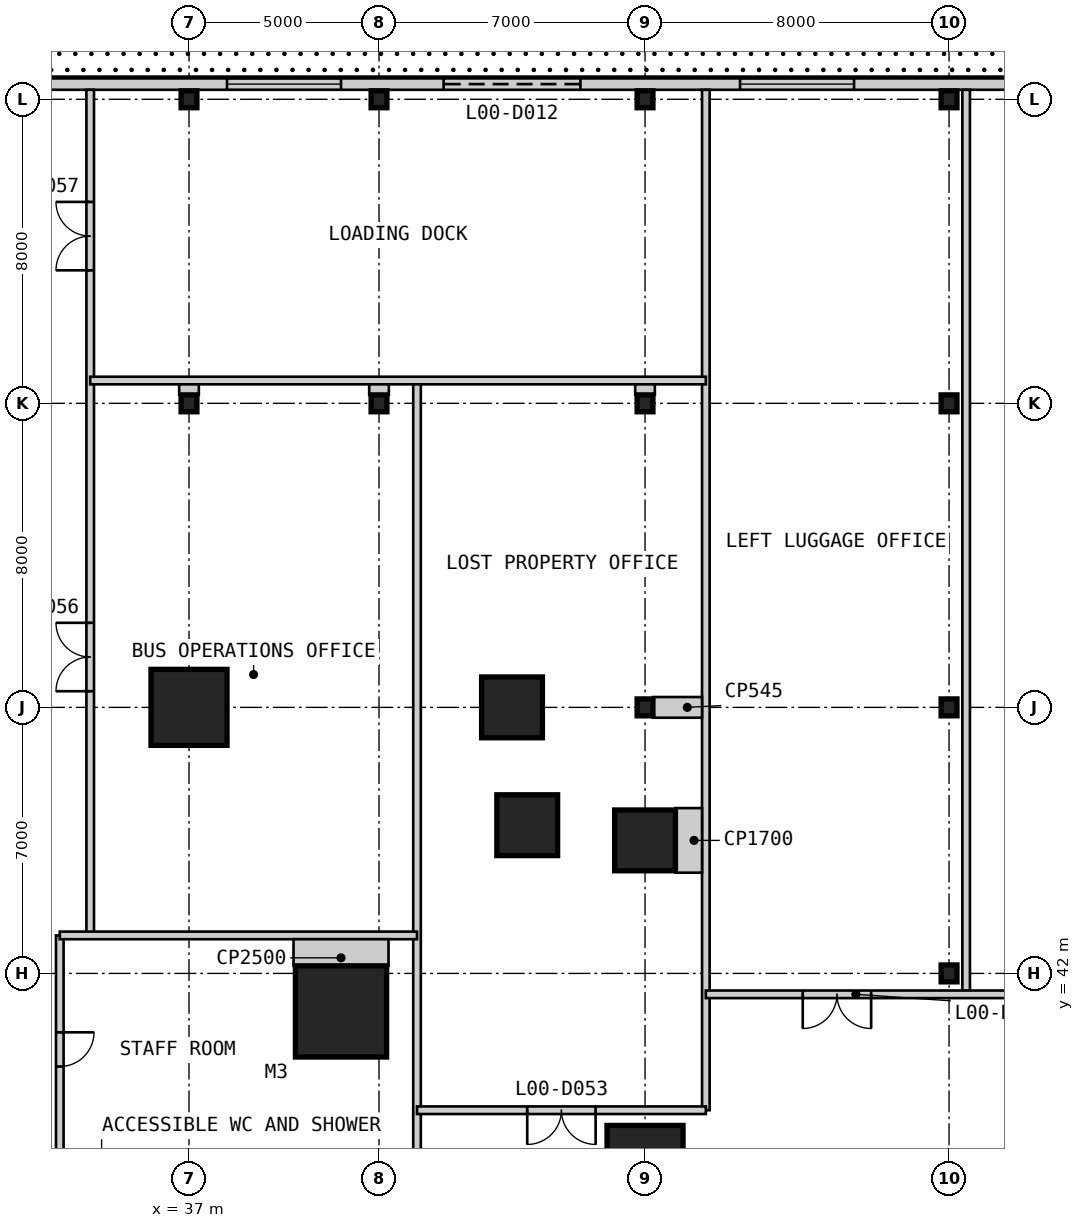
"""IFC4 building model, lengths in metres.
Left out: names, types, materials, properties, quantities, classifications, styles, units other than length and angle.
Written with IfcOpenShell. Run it as: python <this file> out.ifc"""

import sys

from ifc_helpers import new_model, si_unit, direction, frame, frame_2d, origin, origin_2d, place, context, subcontext, project, spatial, rectangle, i_section, extrude, element, fill, save


model = new_model("IFC4")
c1 = context("Model", 3, precision=1e-05, world=origin(), true_north=direction((0.0, 1.0)))
c2 = subcontext(c1, "Body", "Model", "MODEL_VIEW")
j1 = project(units=[si_unit("LENGTHUNIT", "METRE"), si_unit("PLANEANGLEUNIT", "RADIAN")], contexts=[c1])
p1 = place(None, origin())
s1 = spatial("IfcSite", under=j1, at=p1, CompositionType="ELEMENT")
p2 = place(p1, origin())
s2 = spatial("IfcBuilding", under=s1, at=p2, CompositionType="ELEMENT")
p3 = place(p2, origin())
s3 = spatial("IfcBuildingStorey", under=s2, at=p3, CompositionType="ELEMENT", Elevation=0.0)
p4 = place(p3, frame((41.0, 41.0, 0.0), z_axis=(0.0, 0.0, 1.0), x_axis=(1.0, 0.0, 0.0)))
e1 = element("IfcColumn", 1, at=p4, inside=s3, PredefinedType="COLUMN", context=c2, shape_type="SweptSolid", body=[
    extrude(rectangle(XDim=2.4, YDim=2.4, at=origin_2d()), origin(), (0.0, 0.0, 1.0), 7.0),
])
p5 = place(p3, frame((49.0, 37.0, 0.0), z_axis=(0.0, 0.0, 1.0), x_axis=(1.0, 0.0, 0.0)))
e2 = element("IfcColumn", 2, at=p5, inside=s3, PredefinedType="COLUMN", context=c2, shape_type="SweptSolid", body=[
    extrude(rectangle(XDim=2.0, YDim=2.0, at=origin_2d()), origin(), (0.0, 0.0, 1.0), 7.0),
])
for number, where, z_axis, x_axis in (
    (3, (49.0, 45.5, 0.0), (0.0, 0.0, 1.0), (1.0, 0.0, 0.0)),
    (4, (45.9, 45.9, 0.0), (0.0, 0.0, 1.0), (1.0, 0.0, 0.0)),
    (5, (45.5, 49.0, 0.0), (0.0, 0.0, 1.0), (1.0, 0.0, 0.0)),
):
    element("IfcColumn", number, at=place(p3, frame(where, z_axis=z_axis, x_axis=x_axis)), inside=s3, PredefinedType="COLUMN", context=c2, shape_type="SweptSolid", body=[
        extrude(rectangle(XDim=1.6, YDim=1.6, at=origin_2d()), origin(), (0.0, 0.0, 1.0), 7.0),
    ])
p6 = place(p3, frame((37.0, 49.0, 0.0), z_axis=(0.0, 0.0, 1.0), x_axis=(1.0, 0.0, 0.0)))
e6 = element("IfcColumn", 6, at=p6, inside=s3, PredefinedType="COLUMN", context=c2, shape_type="SweptSolid", body=[
    extrude(rectangle(XDim=2.0, YDim=2.0, at=origin_2d()), origin(), (0.0, 0.0, 1.0), 7.0),
])
p7 = place(p3, frame((37.0, 57.0, 0.0), z_axis=(0.0, 0.0, 1.0), x_axis=(1.0, 0.0, 0.0)))
e7 = element("IfcColumn", 7, at=p7, inside=s3, PredefinedType="COLUMN", context=c2, shape_type="SweptSolid", body=[
    extrude(i_section(OverallWidth=0.417, OverallDepth=0.445, WebThickness=0.039, FlangeThickness=0.063, at=origin_2d()), origin(), (0.0, 0.0, 1.0), 7.0),
])
p8 = place(p3, frame((37.0, 65.0, -0.3), z_axis=(0.0, 0.0, 1.0), x_axis=(1.0, 0.0, 0.0)))
e8 = element("IfcColumn", 8, at=p8, inside=s3, PredefinedType="COLUMN", context=c2, shape_type="SweptSolid", body=[
    extrude(i_section(OverallWidth=0.417, OverallDepth=0.445, WebThickness=0.039, FlangeThickness=0.063, at=origin_2d()), origin(), (0.0, 0.0, 1.0), 7.3),
])
p9 = place(p3, frame((42.0, 57.0, 0.0), z_axis=(0.0, 0.0, 1.0), x_axis=(1.0, 0.0, 0.0)))
e9 = element("IfcColumn", 9, at=p9, inside=s3, PredefinedType="COLUMN", context=c2, shape_type="SweptSolid", body=[
    extrude(i_section(OverallWidth=0.417, OverallDepth=0.445, WebThickness=0.039, FlangeThickness=0.063, at=origin_2d()), origin(), (0.0, 0.0, 1.0), 7.0),
])
p10 = place(p3, frame((42.0, 65.0, -0.3), z_axis=(0.0, 0.0, 1.0), x_axis=(1.0, 0.0, 0.0)))
e10 = element("IfcColumn", 10, at=p10, inside=s3, PredefinedType="COLUMN", context=c2, shape_type="SweptSolid", body=[
    extrude(i_section(OverallWidth=0.417, OverallDepth=0.445, WebThickness=0.039, FlangeThickness=0.063, at=origin_2d()), origin(), (0.0, 0.0, 1.0), 7.3),
])
for number, where, z_axis, x_axis in (
    (11, (49.0, 49.0, 0.0), (0.0, 0.0, 1.0), (1.0, 0.0, 0.0)),
    (12, (49.0, 57.0, 0.0), (0.0, 0.0, 1.0), (1.0, 0.0, 0.0)),
):
    element("IfcColumn", number, at=place(p3, frame(where, z_axis=z_axis, x_axis=x_axis)), inside=s3, PredefinedType="COLUMN", context=c2, shape_type="SweptSolid", body=[
        extrude(i_section(OverallWidth=0.417, OverallDepth=0.445, WebThickness=0.039, FlangeThickness=0.063, at=origin_2d()), origin(), (0.0, 0.0, 1.0), 7.0),
    ])
p11 = place(p3, frame((49.0, 65.0, -0.3), z_axis=(0.0, 0.0, 1.0), x_axis=(1.0, 0.0, 0.0)))
e13 = element("IfcColumn", 13, at=p11, inside=s3, PredefinedType="COLUMN", context=c2, shape_type="SweptSolid", body=[
    extrude(i_section(OverallWidth=0.417, OverallDepth=0.445, WebThickness=0.039, FlangeThickness=0.063, at=origin_2d()), origin(), (0.0, 0.0, 1.0), 7.3),
])
for number, where, z_axis, x_axis in (
    (14, (57.0, 42.0, 0.0), (0.0, 0.0, 1.0), (1.0, 0.0, 0.0)),
    (15, (57.0, 49.0, 0.0), (0.0, 0.0, 1.0), (1.0, 0.0, 0.0)),
    (16, (57.0, 57.0, 0.0), (0.0, 0.0, 1.0), (1.0, 0.0, 0.0)),
):
    element("IfcColumn", number, at=place(p3, frame(where, z_axis=z_axis, x_axis=x_axis)), inside=s3, PredefinedType="COLUMN", context=c2, shape_type="SweptSolid", body=[
        extrude(i_section(OverallWidth=0.417, OverallDepth=0.445, WebThickness=0.039, FlangeThickness=0.063, at=origin_2d()), origin(), (0.0, 0.0, 1.0), 7.0),
    ])
p12 = place(p3, frame((57.0, 65.0, -0.3), z_axis=(0.0, 0.0, 1.0), x_axis=(1.0, 0.0, 0.0)))
e17 = element("IfcColumn", 17, at=p12, inside=s3, PredefinedType="COLUMN", context=c2, shape_type="SweptSolid", body=[
    extrude(i_section(OverallWidth=0.417, OverallDepth=0.445, WebThickness=0.039, FlangeThickness=0.063, at=origin_2d()), origin(), (0.0, 0.0, 1.0), 7.3),
])
p13 = place(p3, frame((65.55, 65.4, 0.0), z_axis=(0.0, 0.0, 1.0), x_axis=(-1.0, 0.0, 0.0)))
e18 = element("IfcWall", 18, at=p13, inside=s3, PredefinedType="SOLIDWALL", context=c2, shape_type="SweptSolid", body=[
    extrude(rectangle(XDim=81.1, YDim=0.3, at=frame_2d((40.55, 0.0))), origin(), (0.0, 0.0, 1.0), 6.7),
])
p14 = place(p13, frame((37.65, 0.0, 0.0)))
e19 = element("IfcOpeningElement", 19, at=p14, cuts=e18, PredefinedType="OPENING", context=c2, shape_type="SweptSolid", body=[
    extrude(rectangle(XDim=1.8, YDim=2.4, at=frame_2d((0.9, 1.2))), frame((0.0, 0.16, 0.0), z_axis=(0.0, -1.0, 0.0), x_axis=(1.0, 0.0, 0.0)), (0.0, 0.0, 1.0), 0.32),
])
p15 = place(p13, frame((33.65, 0.0, 0.0)))
e20 = element("IfcOpeningElement", 20, at=p15, cuts=e18, PredefinedType="OPENING", context=c2, shape_type="SweptSolid", body=[
    extrude(rectangle(XDim=1.8, YDim=2.4, at=frame_2d((0.9, 1.2))), frame((0.0, 0.16, 0.0), z_axis=(0.0, -1.0, 0.0), x_axis=(1.0, 0.0, 0.0)), (0.0, 0.0, 1.0), 0.32),
])
p16 = place(p13, frame((18.25, 0.0, 0.0)))
e21 = element("IfcOpeningElement", 21, at=p16, cuts=e18, PredefinedType="OPENING", context=c2, shape_type="SweptSolid", body=[
    extrude(rectangle(XDim=3.6, YDim=4.5, at=frame_2d((1.8, 2.25))), frame((0.0, 0.16, 0.0), z_axis=(0.0, -1.0, 0.0), x_axis=(1.0, 0.0, 0.0)), (0.0, 0.0, 1.0), 0.32),
])
p17 = place(p13, frame((75.05, 0.0, 0.9)))
e22 = element("IfcOpeningElement", 22, at=p17, cuts=e18, PredefinedType="OPENING", context=c2, shape_type="SweptSolid", body=[
    extrude(rectangle(XDim=3.0, YDim=2.4, at=frame_2d((1.5, 1.2))), frame((0.0, 0.16, 0.0), z_axis=(0.0, -1.0, 0.0), x_axis=(1.0, 0.0, 0.0)), (0.0, 0.0, 1.0), 0.32),
])
p18 = place(p13, frame((67.05, 0.0, 0.9)))
e23 = element("IfcOpeningElement", 23, at=p18, cuts=e18, PredefinedType="OPENING", context=c2, shape_type="SweptSolid", body=[
    extrude(rectangle(XDim=3.0, YDim=2.4, at=frame_2d((1.5, 1.2))), frame((0.0, 0.16, 0.0), z_axis=(0.0, -1.0, 0.0), x_axis=(1.0, 0.0, 0.0)), (0.0, 0.0, 1.0), 0.32),
])
p19 = place(p13, frame((59.05, 0.0, 0.9)))
e24 = element("IfcOpeningElement", 24, at=p19, cuts=e18, PredefinedType="OPENING", context=c2, shape_type="SweptSolid", body=[
    extrude(rectangle(XDim=3.0, YDim=2.4, at=frame_2d((1.5, 1.2))), frame((0.0, 0.16, 0.0), z_axis=(0.0, -1.0, 0.0), x_axis=(1.0, 0.0, 0.0)), (0.0, 0.0, 1.0), 0.32),
])
p20 = place(p13, frame((45.05, 0.0, 0.9)))
e25 = element("IfcOpeningElement", 25, at=p20, cuts=e18, PredefinedType="OPENING", context=c2, shape_type="SweptSolid", body=[
    extrude(rectangle(XDim=3.0, YDim=2.4, at=frame_2d((1.5, 1.2))), frame((0.0, 0.16, 0.0), z_axis=(0.0, -1.0, 0.0), x_axis=(1.0, 0.0, 0.0)), (0.0, 0.0, 1.0), 0.32),
])
p21 = place(p13, frame((24.55, 0.0, 0.9)))
e26 = element("IfcOpeningElement", 26, at=p21, cuts=e18, PredefinedType="OPENING", context=c2, shape_type="SweptSolid", body=[
    extrude(rectangle(XDim=3.0, YDim=2.4, at=frame_2d((1.5, 1.2))), frame((0.0, 0.16, 0.0), z_axis=(0.0, -1.0, 0.0), x_axis=(1.0, 0.0, 0.0)), (0.0, 0.0, 1.0), 0.32),
])
p22 = place(p13, frame((11.05, 0.0, 0.9)))
e27 = element("IfcOpeningElement", 27, at=p22, cuts=e18, PredefinedType="OPENING", context=c2, shape_type="SweptSolid", body=[
    extrude(rectangle(XDim=3.0, YDim=2.4, at=frame_2d((1.5, 1.2))), frame((0.0, 0.16, 0.0), z_axis=(0.0, -1.0, 0.0), x_axis=(1.0, 0.0, 0.0)), (0.0, 0.0, 1.0), 0.32),
])
p23 = place(p13, frame((3.05, 0.0, 0.9)))
e28 = element("IfcOpeningElement", 28, at=p23, cuts=e18, PredefinedType="OPENING", context=c2, shape_type="SweptSolid", body=[
    extrude(rectangle(XDim=3.0, YDim=2.4, at=frame_2d((1.5, 1.2))), frame((0.0, 0.16, 0.0), z_axis=(0.0, -1.0, 0.0), x_axis=(1.0, 0.0, 0.0)), (0.0, 0.0, 1.0), 0.32),
])
p24 = place(p3, frame((33.6, 37.0, 0.0), z_axis=(0.0, 0.0, 1.0), x_axis=(0.0, 1.0, 0.0)))
e29 = element("IfcWall", 29, at=p24, inside=s3, PredefinedType="PARTITIONING", context=c2, shape_type="SweptSolid", body=[
    extrude(rectangle(XDim=6.0, YDim=0.2, at=frame_2d((3.0, 0.0))), origin(), (0.0, 0.0, 1.0), 6.7),
])
p25 = place(p24, frame((2.55, 0.0, 0.0)))
e30 = element("IfcOpeningElement", 30, at=p25, cuts=e29, PredefinedType="OPENING", context=c2, shape_type="SweptSolid", body=[
    extrude(rectangle(XDim=0.9, YDim=2.2, at=frame_2d((0.45, 1.1))), frame((0.0, 0.11, 0.0), z_axis=(0.0, -1.0, 0.0), x_axis=(1.0, 0.0, 0.0)), (0.0, 0.0, 1.0), 0.22),
])
p26 = place(p3, frame((34.4, 43.0, 0.0), z_axis=(0.0, 0.0, 1.0), x_axis=(0.0, 1.0, 0.0)))
e31 = element("IfcWall", 31, at=p26, inside=s3, PredefinedType="PARTITIONING", context=c2, shape_type="SweptSolid", body=[
    extrude(rectangle(XDim=22.25, YDim=0.2, at=frame_2d((11.125, 0.0))), origin(), (0.0, 0.0, 1.0), 6.7),
])
p27 = place(p26, frame((6.425, 0.0, 0.0)))
e32 = element("IfcOpeningElement", 32, at=p27, cuts=e31, PredefinedType="OPENING", context=c2, shape_type="SweptSolid", body=[
    extrude(rectangle(XDim=1.8, YDim=2.4, at=frame_2d((0.9, 1.2))), frame((0.0, 0.11, 0.0), z_axis=(0.0, -1.0, 0.0), x_axis=(1.0, 0.0, 0.0)), (0.0, 0.0, 1.0), 0.22),
])
p28 = place(p26, frame((17.5, 0.0, 0.0)))
e33 = element("IfcOpeningElement", 33, at=p28, cuts=e31, PredefinedType="OPENING", context=c2, shape_type="SweptSolid", body=[
    extrude(rectangle(XDim=1.8, YDim=2.4, at=frame_2d((0.9, 1.2))), frame((0.0, 0.11, 0.0), z_axis=(0.0, -1.0, 0.0), x_axis=(1.0, 0.0, 0.0)), (0.0, 0.0, 1.0), 0.22),
])
p29 = place(p3, frame((43.0, 37.0, 0.0), z_axis=(0.0, 0.0, 1.0), x_axis=(0.0, 1.0, 0.0)))
e34 = element("IfcWall", 34, at=p29, inside=s3, PredefinedType="PARTITIONING", context=c2, shape_type="SweptSolid", body=[
    extrude(rectangle(XDim=20.6, YDim=0.2, at=frame_2d((10.3, 0.0))), origin(), (0.0, 0.0, 1.0), 6.7),
])
p30 = place(p3, frame((50.6, 38.4, 0.0), z_axis=(0.0, 0.0, 1.0), x_axis=(0.0, 1.0, 0.0)))
e35 = element("IfcWall", 35, at=p30, inside=s3, PredefinedType="PARTITIONING", context=c2, shape_type="SweptSolid", body=[
    extrude(rectangle(XDim=26.85, YDim=0.2, at=frame_2d((13.425, 0.0))), origin(), (0.0, 0.0, 1.0), 6.7),
])
p31 = place(p3, frame((57.45, 41.45, 0.0), z_axis=(0.0, 0.0, 1.0), x_axis=(0.0, 1.0, 0.0)))
e36 = element("IfcWall", 36, at=p31, inside=s3, PredefinedType="PARTITIONING", context=c2, shape_type="SweptSolid", body=[
    extrude(rectangle(XDim=23.8, YDim=0.2, at=frame_2d((11.9, 0.0))), origin(), (0.0, 0.0, 1.0), 6.7),
])
p32 = place(p3, frame((43.0, 38.4, 0.0), z_axis=(0.0, 0.0, 1.0), x_axis=(1.0, 0.0, 0.0)))
e37 = element("IfcWall", 37, at=p32, inside=s3, PredefinedType="PARTITIONING", context=c2, shape_type="SweptSolid", body=[
    extrude(rectangle(XDim=7.6, YDim=0.2, at=frame_2d((3.8, 0.0))), origin(), (0.0, 0.0, 1.0), 6.7),
])
p33 = place(p32, frame((2.9, 0.0, 0.0)))
e38 = element("IfcOpeningElement", 38, at=p33, cuts=e37, PredefinedType="OPENING", context=c2, shape_type="SweptSolid", body=[
    extrude(rectangle(XDim=1.8, YDim=2.4, at=frame_2d((0.9, 1.2))), frame((0.0, 0.11, 0.0), z_axis=(0.0, -1.0, 0.0), x_axis=(1.0, 0.0, 0.0)), (0.0, 0.0, 1.0), 0.22),
])
p34 = place(p3, frame((50.6, 41.45, 0.0), z_axis=(0.0, 0.0, 1.0), x_axis=(1.0, 0.0, 0.0)))
e39 = element("IfcWall", 39, at=p34, inside=s3, PredefinedType="PARTITIONING", context=c2, shape_type="SweptSolid", body=[
    extrude(rectangle(XDim=14.65, YDim=0.2, at=frame_2d((7.325, 0.0))), origin(), (0.0, 0.0, 1.0), 6.7),
])
p35 = place(p34, frame((2.55, 0.0, 0.0)))
e40 = element("IfcOpeningElement", 40, at=p35, cuts=e39, PredefinedType="OPENING", context=c2, shape_type="SweptSolid", body=[
    extrude(rectangle(XDim=1.8, YDim=2.4, at=frame_2d((0.9, 1.2))), frame((0.0, 0.11, 0.0), z_axis=(0.0, -1.0, 0.0), x_axis=(1.0, 0.0, 0.0)), (0.0, 0.0, 1.0), 0.22),
])
p36 = place(p34, frame((9.825, 0.0, 0.0)))
e41 = element("IfcOpeningElement", 41, at=p36, cuts=e39, PredefinedType="OPENING", context=c2, shape_type="SweptSolid", body=[
    extrude(rectangle(XDim=1.8, YDim=2.4, at=frame_2d((0.9, 1.2))), frame((0.0, 0.11, 0.0), z_axis=(0.0, -1.0, 0.0), x_axis=(1.0, 0.0, 0.0)), (0.0, 0.0, 1.0), 0.22),
])
p37 = place(p3, frame((33.6, 43.0, 0.0), z_axis=(0.0, 0.0, 1.0), x_axis=(1.0, 0.0, 0.0)))
e42 = element("IfcWall", 42, at=p37, inside=s3, PredefinedType="PARTITIONING", context=c2, shape_type="SweptSolid", body=[
    extrude(rectangle(XDim=9.4, YDim=0.2, at=frame_2d((4.7, 0.0))), origin(), (0.0, 0.0, 1.0), 6.7),
])
p38 = place(p3, frame((34.4, 57.6, 0.0), z_axis=(0.0, 0.0, 1.0), x_axis=(1.0, 0.0, 0.0)))
e43 = element("IfcWall", 43, at=p38, inside=s3, PredefinedType="PARTITIONING", context=c2, shape_type="SweptSolid", body=[
    extrude(rectangle(XDim=16.2, YDim=0.2, at=frame_2d((8.1, 0.0))), origin(), (0.0, 0.0, 1.0), 6.7),
])
p39 = place(p3, frame((50.5, 45.5, 0.0), z_axis=(0.0, 0.0, 1.0), x_axis=(-1.0, 0.0, 0.0)))
e44 = element("IfcWall", 44, at=p39, inside=s3, PredefinedType="PARTITIONING", context=c2, shape_type="SweptSolid", body=[
    extrude(rectangle(XDim=0.7, YDim=1.7, at=frame_2d((0.35, 0.0))), origin(), (0.0, 0.0, 1.0), 6.7),
])
p40 = place(p3, frame((50.5, 49.0, 0.0), z_axis=(0.0, 0.0, 1.0), x_axis=(-1.0, 0.0, 0.0)))
e45 = element("IfcWall", 45, at=p40, inside=s3, PredefinedType="PARTITIONING", context=c2, shape_type="SweptSolid", body=[
    extrude(rectangle(XDim=1.292, YDim=0.545, at=frame_2d((0.646, 0.0))), origin(), (0.0, 0.0, 1.0), 5.954),
])
for number, where, z_axis, x_axis in (
    (46, (49.0, 57.5, 0.0), (0.0, 0.0, 1.0), (0.0, -1.0, 0.0)),
    (47, (37.0, 57.5, 0.0), (0.0, 0.0, 1.0), (0.0, -1.0, 0.0)),
    (48, (42.0, 57.5, 0.0), (0.0, 0.0, 1.0), (0.0, -1.0, 0.0)),
):
    element("IfcWall", number, at=place(p3, frame(where, z_axis=z_axis, x_axis=x_axis)), inside=s3, PredefinedType="PARTITIONING", context=c2, shape_type="SweptSolid", body=[
        extrude(rectangle(XDim=0.278, YDim=0.517, at=frame_2d((0.139, 0.0))), origin(), (0.0, 0.0, 1.0), 6.7),
    ])
p41 = place(p3, frame((41.0, 42.9, 0.0), z_axis=(0.0, 0.0, 1.0), x_axis=(0.0, -1.0, 0.0)))
e49 = element("IfcWall", 49, at=p41, inside=s3, PredefinedType="PARTITIONING", context=c2, shape_type="SweptSolid", body=[
    extrude(rectangle(XDim=0.7, YDim=2.5, at=frame_2d((0.35, 0.0))), origin(), (0.0, 0.0, 1.0), 6.7),
])
p42 = place(p16, origin())
e50 = element("IfcDoor", 50, at=p42, inside=s3, OperationType="ROLLINGUP", PredefinedType="DOOR", context=c2, shape_type="SweptSolid", body=[
    extrude(rectangle(XDim=3.6, YDim=4.5, at=frame_2d((1.8, 2.25))), frame((0.0, 0.025, 0.0), z_axis=(0.0, -1.0, 0.0), x_axis=(1.0, 0.0, 0.0)), (0.0, 0.0, 1.0), 0.05),
])
fill(e21, e50)
p43 = place(p21, origin())
e51 = element("IfcWindow", 51, at=p43, inside=s3, PartitioningType="SINGLE_PANEL", PredefinedType="WINDOW", context=c2, shape_type="SweptSolid", body=[
    extrude(rectangle(XDim=3.0, YDim=2.4, at=frame_2d((1.5, 1.2))), frame((0.0, 0.03, 0.0), z_axis=(0.0, -1.0, 0.0), x_axis=(1.0, 0.0, 0.0)), (0.0, 0.0, 1.0), 0.06),
])
fill(e26, e51)
p44 = place(p22, origin())
e52 = element("IfcWindow", 52, at=p44, inside=s3, PartitioningType="SINGLE_PANEL", PredefinedType="WINDOW", context=c2, shape_type="SweptSolid", body=[
    extrude(rectangle(XDim=3.0, YDim=2.4, at=frame_2d((1.5, 1.2))), frame((0.0, 0.03, 0.0), z_axis=(0.0, -1.0, 0.0), x_axis=(1.0, 0.0, 0.0)), (0.0, 0.0, 1.0), 0.06),
])
fill(e27, e52)
p45 = place(p33, frame((1.8, 0.0, 0.0), z_axis=(0.0, 0.0, 1.0), x_axis=(-1.0, 0.0, 0.0)))
e53 = element("IfcDoor", 53, at=p45, inside=s3, OperationType="DOUBLE_DOOR_SINGLE_SWING", PredefinedType="DOOR", context=c2, shape_type="SweptSolid", body=[
    extrude(rectangle(XDim=1.8, YDim=2.4, at=frame_2d((0.9, 1.2))), frame((0.0, 0.025, 0.0), z_axis=(0.0, -1.0, 0.0), x_axis=(1.0, 0.0, 0.0)), (0.0, 0.0, 1.0), 0.05),
])
fill(e38, e53)
p46 = place(p35, frame((1.8, 0.0, 0.0), z_axis=(0.0, 0.0, 1.0), x_axis=(-1.0, 0.0, 0.0)))
e54 = element("IfcDoor", 54, at=p46, inside=s3, OperationType="DOUBLE_DOOR_SINGLE_SWING", PredefinedType="DOOR", context=c2, shape_type="SweptSolid", body=[
    extrude(rectangle(XDim=1.8, YDim=2.4, at=frame_2d((0.9, 1.2))), frame((0.0, 0.025, 0.0), z_axis=(0.0, -1.0, 0.0), x_axis=(1.0, 0.0, 0.0)), (0.0, 0.0, 1.0), 0.05),
])
fill(e40, e54)
p47 = place(p27, origin())
e55 = element("IfcDoor", 55, at=p47, inside=s3, OperationType="DOUBLE_DOOR_SINGLE_SWING", PredefinedType="DOOR", context=c2, shape_type="SweptSolid", body=[
    extrude(rectangle(XDim=1.8, YDim=2.4, at=frame_2d((0.9, 1.2))), frame((0.0, 0.025, 0.0), z_axis=(0.0, -1.0, 0.0), x_axis=(1.0, 0.0, 0.0)), (0.0, 0.0, 1.0), 0.05),
])
fill(e32, e55)
p48 = place(p28, origin())
e56 = element("IfcDoor", 56, at=p48, inside=s3, OperationType="DOUBLE_DOOR_SINGLE_SWING", PredefinedType="DOOR", context=c2, shape_type="SweptSolid", body=[
    extrude(rectangle(XDim=1.8, YDim=2.4, at=frame_2d((0.9, 1.2))), frame((0.0, 0.025, 0.0), z_axis=(0.0, -1.0, 0.0), x_axis=(1.0, 0.0, 0.0)), (0.0, 0.0, 1.0), 0.05),
])
fill(e33, e56)
p49 = place(p25, frame((0.9, 0.0, 0.0), z_axis=(0.0, 0.0, 1.0), x_axis=(-1.0, 0.0, 0.0)))
e57 = element("IfcDoor", 57, at=p49, inside=s3, OperationType="SINGLE_SWING_LEFT", PredefinedType="DOOR", context=c2, shape_type="SweptSolid", body=[
    extrude(rectangle(XDim=0.9, YDim=2.2, at=frame_2d((0.45, 1.1))), frame((0.0, 0.025, 0.0), z_axis=(0.0, -1.0, 0.0), x_axis=(1.0, 0.0, 0.0)), (0.0, 0.0, 1.0), 0.05),
])
fill(e30, e57)
save(model, sys.argv[1])
